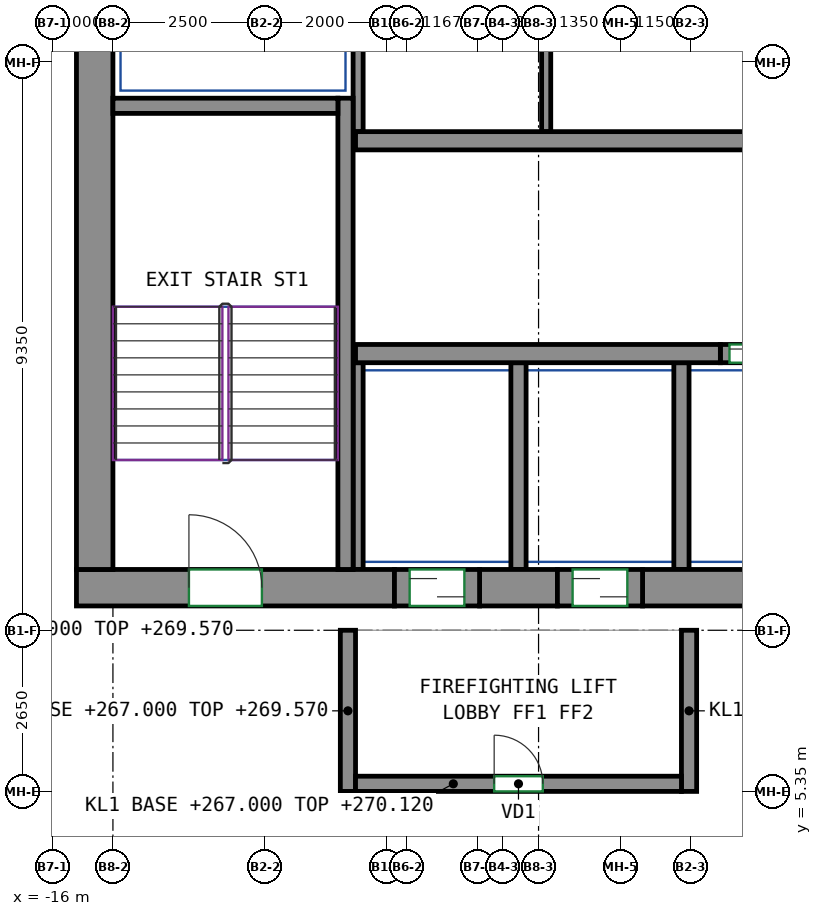
"""IFC4 building model, lengths in metres.
Left out: names, types, materials, properties, quantities, classifications, styles, units other than length and angle.
Written with IfcOpenShell. Run it as: python <this file> out.ifc"""

import sys

from ifc_helpers import new_model, si_unit, direction, frame, frame_2d, origin, place, context, subcontext, project, spatial, rectangle, extrude, source, transform, mapped, element, fill, save


model = new_model("IFC4")
c1 = context("Model", 3, precision=1e-05, world=origin(), true_north=direction((0.0, 1.0)))
c2 = subcontext(c1, "Body", "Model", "MODEL_VIEW")
j1 = project(units=[si_unit("LENGTHUNIT", "METRE"), si_unit("PLANEANGLEUNIT", "RADIAN")], contexts=[c1])
p1 = place(None, origin())
s1 = spatial("IfcSite", under=j1, at=p1, CompositionType="ELEMENT")
p2 = place(p1, origin())
s2 = spatial("IfcBuilding", under=s1, at=p2, CompositionType="ELEMENT")
p3 = place(p2, frame((0.0, 0.0, 267.0)))
s3 = spatial("IfcBuildingStorey", under=s2, at=p3, CompositionType="ELEMENT", Elevation=267.0)
m1 = source(origin(), c2, "Body", "SweptSolid", [
    extrude(rectangle(XDim=5.23, YDim=0.6, at=frame_2d((2.615, 0.0))), origin(), (0.0, 0.0, 1.0), 3.12),
])
p4 = place(p3, frame((-15.6, 8.7, 0.0), z_axis=(0.0, 0.0, 1.0), x_axis=(1.0, 0.0, 0.0)))
e1 = element("IfcWall", 1, at=p4, inside=s3, PredefinedType="SHEAR", context=c2, shape_type="MappedRepresentation", body=[
    mapped(m1, transform((0.0, 0.0, 0.0))),
])
p5 = place(p4, frame((1.85, 0.0, 0.0)))
e2 = element("IfcOpeningElement", 2, at=p5, cuts=e1, PredefinedType="OPENING", context=c2, shape_type="SweptSolid", body=[
    extrude(rectangle(XDim=1.2, YDim=2.1, at=frame_2d((0.6, 1.05))), frame((0.0, 0.31, 0.0), z_axis=(0.0, -1.0, 0.0), x_axis=(1.0, 0.0, 0.0)), (0.0, 0.0, 1.0), 0.62),
])
m2 = source(origin(), c2, "Body", "SweptSolid", [
    extrude(rectangle(XDim=1.28, YDim=0.6, at=frame_2d((0.64, 0.0))), origin(), (0.0, 0.0, 1.0), 3.12),
])
p6 = place(p3, frame((-8.97, 8.7, 0.0), z_axis=(0.0, 0.0, 1.0), x_axis=(1.0, 0.0, 0.0)))
e3 = element("IfcWall", 3, at=p6, inside=s3, PredefinedType="SHEAR", context=c2, shape_type="MappedRepresentation", body=[
    mapped(m2, transform((0.0, 0.0, 0.0))),
])
m3 = source(origin(), c2, "Body", "SweptSolid", [
    extrude(rectangle(XDim=14.18, YDim=0.6, at=frame_2d((7.09, 0.0))), origin(), (0.0, 0.0, 1.0), 3.12),
])
p7 = place(p3, frame((-6.29, 8.7, 0.0), z_axis=(0.0, 0.0, 1.0), x_axis=(1.0, 0.0, 0.0)))
e4 = element("IfcWall", 4, at=p7, inside=s3, PredefinedType="SHEAR", context=c2, shape_type="MappedRepresentation", body=[
    mapped(m3, transform((0.0, 0.0, 0.0))),
])
m4 = source(origin(), c2, "Body", "SweptSolid", [
    extrude(rectangle(XDim=12.0, YDim=0.6, at=frame_2d((6.0, 0.0))), origin(), (0.0, 0.0, 1.0), 3.12),
])
p8 = place(p3, frame((-15.3, 9.0, 0.0), z_axis=(0.0, 0.0, 1.0), x_axis=(0.0, 1.0, 0.0)))
e5 = element("IfcWall", 5, at=p8, inside=s3, PredefinedType="SHEAR", context=c2, shape_type="MappedRepresentation", body=[
    mapped(m4, transform((0.0, 0.0, 0.0))),
])
m5 = source(origin(), c2, "Body", "SweptSolid", [
    extrude(rectangle(XDim=7.75, YDim=0.25, at=frame_2d((3.875, 0.0))), origin(), (0.0, 0.0, 1.0), 3.12),
])
p9 = place(p3, frame((-11.175, 9.0, 0.0), z_axis=(0.0, 0.0, 1.0), x_axis=(0.0, 1.0, 0.0)))
e6 = element("IfcWall", 6, at=p9, inside=s3, PredefinedType="SHEAR", context=c2, shape_type="MappedRepresentation", body=[
    mapped(m5, transform((0.0, 0.0, 0.0))),
])
m6 = source(origin(), c2, "Body", "SweptSolid", [
    extrude(rectangle(XDim=3.7, YDim=0.25, at=frame_2d((1.85, 0.0))), origin(), (0.0, 0.0, 1.0), 3.12),
])
p10 = place(p3, frame((-15.0, 16.625, 0.0), z_axis=(0.0, 0.0, 1.0), x_axis=(1.0, 0.0, 0.0)))
e7 = element("IfcWall", 7, at=p10, inside=s3, PredefinedType="SHEAR", context=c2, shape_type="MappedRepresentation", body=[
    mapped(m6, transform((0.0, 0.0, 0.0))),
])
m7 = source(origin(), c2, "Body", "SweptSolid", [
    extrude(rectangle(XDim=6.0, YDim=0.3, at=frame_2d((3.0, 0.0))), origin(), (0.0, 0.0, 1.0), 3.12),
])
p11 = place(p3, frame((-11.01, 12.55, 0.0), z_axis=(0.0, 0.0, 1.0), x_axis=(1.0, 0.0, 0.0)))
e8 = element("IfcWall", 8, at=p11, inside=s3, PredefinedType="SHEAR", context=c2, shape_type="MappedRepresentation", body=[
    mapped(m7, transform((0.0, 0.0, 0.0))),
])
m8 = source(origin(), c2, "Body", "SweptSolid", [
    extrude(rectangle(XDim=22.08, YDim=0.3, at=frame_2d((11.04, 0.0))), origin(), (0.0, 0.0, 1.0), 3.12),
])
p12 = place(p3, frame((-11.01, 16.05, 0.0), z_axis=(0.0, 0.0, 1.0), x_axis=(1.0, 0.0, 0.0)))
e9 = element("IfcWall", 9, at=p12, inside=s3, PredefinedType="SHEAR", context=c2, shape_type="MappedRepresentation", body=[
    mapped(m8, transform((0.0, 0.0, 0.0))),
])
m9 = source(origin(), c2, "Body", "SweptSolid", [
    extrude(rectangle(XDim=1.4, YDim=0.3, at=frame_2d((0.7, 0.0))), origin(), (0.0, 0.0, 1.0), 3.12),
])
p13 = place(p3, frame((-5.01, 12.55, 0.0), z_axis=(0.0, 0.0, 1.0), x_axis=(1.0, 0.0, 0.0)))
e10 = element("IfcWall", 10, at=p13, inside=s3, PredefinedType="PARTITIONING", context=c2, shape_type="MappedRepresentation", body=[
    mapped(m9, transform((0.0, 0.0, 0.0))),
])
p14 = place(p13, frame((0.15, 0.0, 0.0)))
e11 = element("IfcOpeningElement", 11, at=p14, cuts=e10, PredefinedType="OPENING", context=c2, shape_type="SweptSolid", body=[
    extrude(rectangle(XDim=1.1, YDim=2.1, at=frame_2d((0.55, 1.05))), frame((0.0, 0.16, 0.0), z_axis=(0.0, -1.0, 0.0), x_axis=(1.0, 0.0, 0.0)), (0.0, 0.0, 1.0), 0.32),
])
m10 = source(origin(), c2, "Body", "SweptSolid", [
    extrude(rectangle(XDim=2.65, YDim=0.25, at=frame_2d((1.325, 0.0))), origin(), (0.0, 0.0, 1.0), 2.57),
])
for number, where, z_axis, x_axis in (
    (12, (-11.135, 5.35, 0.0), (0.0, 0.0, 1.0), (0.0, 1.0, 0.0)),
    (13, (-5.525, 5.35, 0.0), (0.0, 0.0, 1.0), (0.0, 1.0, 0.0)),
):
    element("IfcWall", number, at=place(p3, frame(where, z_axis=z_axis, x_axis=x_axis)), inside=s3, PredefinedType="PARTITIONING", context=c2, shape_type="MappedRepresentation", body=[
        mapped(m10, transform((0.0, 0.0, 0.0))),
    ])
m11 = source(origin(), c2, "Body", "SweptSolid", [
    extrude(rectangle(XDim=5.36, YDim=0.25, at=frame_2d((2.68, 0.0))), origin(), (0.0, 0.0, 1.0), 3.12),
])
p15 = place(p3, frame((-11.01, 5.475, 0.0), z_axis=(0.0, 0.0, 1.0), x_axis=(1.0, 0.0, 0.0)))
e14 = element("IfcWall", 14, at=p15, inside=s3, PredefinedType="PARTITIONING", context=c2, shape_type="MappedRepresentation", body=[
    mapped(m11, transform((0.0, 0.0, 0.0))),
])
p16 = place(p15, frame((2.28, 0.0, 0.0)))
e15 = element("IfcOpeningElement", 15, at=p16, cuts=e14, PredefinedType="OPENING", context=c2, shape_type="SweptSolid", body=[
    extrude(rectangle(XDim=0.8, YDim=2.0, at=frame_2d((0.4, 1.0))), frame((0.0, 0.135, 0.0), z_axis=(0.0, -1.0, 0.0), x_axis=(1.0, 0.0, 0.0)), (0.0, 0.0, 1.0), 0.27),
])
m12 = source(origin(), c2, "Body", "SweptSolid", [
    extrude(rectangle(XDim=4.8, YDim=0.165, at=frame_2d((2.4, 0.0))), origin(), (0.0, 0.0, 1.0), 3.12),
])
p17 = place(p3, frame((-10.968, 16.2, 0.0), z_axis=(0.0, 0.0, 1.0), x_axis=(0.0, 1.0, 0.0)))
e16 = element("IfcWall", 16, at=p17, inside=s3, PredefinedType="PARTITIONING", context=c2, shape_type="MappedRepresentation", body=[
    mapped(m12, transform((0.0, 0.0, 0.0))),
])
m13 = source(origin(), c2, "Body", "SweptSolid", [
    extrude(rectangle(XDim=3.4, YDim=0.165, at=frame_2d((1.7, 0.0))), origin(), (0.0, 0.0, 1.0), 3.12),
])
p18 = place(p3, frame((-10.968, 9.0, 0.0), z_axis=(0.0, 0.0, 1.0), x_axis=(0.0, 1.0, 0.0)))
e17 = element("IfcWall", 17, at=p18, inside=s3, PredefinedType="PARTITIONING", context=c2, shape_type="MappedRepresentation", body=[
    mapped(m13, transform((0.0, 0.0, 0.0))),
])
m14 = source(origin(), c2, "Body", "SweptSolid", [
    extrude(rectangle(XDim=3.4, YDim=0.25, at=frame_2d((1.7, 0.0))), origin(), (0.0, 0.0, 1.0), 3.12),
])
for number, where, z_axis, x_axis in (
    (18, (-5.65, 9.0, 0.0), (0.0, 0.0, 1.0), (0.0, 1.0, 0.0)),
    (19, (-8.33, 9.0, 0.0), (0.0, 0.0, 1.0), (0.0, 1.0, 0.0)),
):
    element("IfcWall", number, at=place(p3, frame(where, z_axis=z_axis, x_axis=x_axis)), inside=s3, PredefinedType="PARTITIONING", context=c2, shape_type="MappedRepresentation", body=[
        mapped(m14, transform((0.0, 0.0, 0.0))),
    ])
m15 = source(origin(), c2, "Body", "SweptSolid", [
    extrude(rectangle(XDim=4.8, YDim=0.15, at=frame_2d((2.4, 0.0))), origin(), (0.0, 0.0, 1.0), 3.12),
])
p19 = place(p3, frame((-7.875, 16.2, 0.0), z_axis=(0.0, 0.0, 1.0), x_axis=(0.0, 1.0, 0.0)))
e20 = element("IfcWall", 20, at=p19, inside=s3, PredefinedType="PARTITIONING", context=c2, shape_type="MappedRepresentation", body=[
    mapped(m15, transform((0.0, 0.0, 0.0))),
])
m16 = source(origin(), c2, "Body", "SweptSolid", [
    extrude(rectangle(XDim=1.4, YDim=0.6, at=frame_2d((0.7, 0.0))), origin(), (0.0, 0.0, 1.0), 2.7),
])
p20 = place(p3, frame((-10.37, 8.7, 0.0), z_axis=(0.0, 0.0, 1.0), x_axis=(1.0, 0.0, 0.0)))
e21 = element("IfcWall", 21, at=p20, inside=s3, PredefinedType="PARTITIONING", context=c2, shape_type="MappedRepresentation", body=[
    mapped(m16, transform((0.0, 0.0, 0.0))),
])
p21 = place(p20, frame((0.25, 0.0, 0.0)))
e22 = element("IfcOpeningElement", 22, at=p21, cuts=e21, PredefinedType="OPENING", context=c2, shape_type="SweptSolid", body=[
    extrude(rectangle(XDim=0.9, YDim=2.1, at=frame_2d((0.45, 1.05))), frame((0.0, 0.31, 0.0), z_axis=(0.0, -1.0, 0.0), x_axis=(1.0, 0.0, 0.0)), (0.0, 0.0, 1.0), 0.62),
])
m17 = source(origin(), c2, "Body", "SweptSolid", [
    extrude(rectangle(XDim=1.4, YDim=0.6, at=frame_2d((0.7, 0.0))), origin(), (0.0, 0.0, 1.0), 2.7),
])
p22 = place(p3, frame((-7.69, 8.7, 0.0), z_axis=(0.0, 0.0, 1.0), x_axis=(1.0, 0.0, 0.0)))
e23 = element("IfcWall", 23, at=p22, inside=s3, PredefinedType="PARTITIONING", context=c2, shape_type="MappedRepresentation", body=[
    mapped(m17, transform((0.0, 0.0, 0.0))),
])
p23 = place(p22, frame((0.25, 0.0, 0.0)))
e24 = element("IfcOpeningElement", 24, at=p23, cuts=e23, PredefinedType="OPENING", context=c2, shape_type="SweptSolid", body=[
    extrude(rectangle(XDim=0.9, YDim=2.1, at=frame_2d((0.45, 1.05))), frame((0.0, 0.31, 0.0), z_axis=(0.0, -1.0, 0.0), x_axis=(1.0, 0.0, 0.0)), (0.0, 0.0, 1.0), 0.62),
])
p24 = place(p16, origin())
e25 = element("IfcDoor", 25, at=p24, inside=s3, OperationType="SINGLE_SWING_LEFT", PredefinedType="DOOR", context=c2, shape_type="SweptSolid", body=[
    extrude(rectangle(XDim=0.8, YDim=2.0, at=frame_2d((0.4, 1.0))), frame((0.0, 0.025, 0.0), z_axis=(0.0, -1.0, 0.0), x_axis=(1.0, 0.0, 0.0)), (0.0, 0.0, 1.0), 0.05),
])
fill(e15, e25)
p25 = place(p21, origin())
e26 = element("IfcDoor", 26, at=p25, inside=s3, OperationType="SLIDING_TO_LEFT", PredefinedType="DOOR", context=c2, shape_type="SweptSolid", body=[
    extrude(rectangle(XDim=0.9, YDim=2.1, at=frame_2d((0.45, 1.05))), frame((0.0, 0.205, 0.0), z_axis=(0.0, -1.0, 0.0), x_axis=(1.0, 0.0, 0.0)), (0.0, 0.0, 1.0), 0.05),
])
fill(e22, e26)
p26 = place(p23, origin())
e27 = element("IfcDoor", 27, at=p26, inside=s3, OperationType="SLIDING_TO_RIGHT", PredefinedType="DOOR", context=c2, shape_type="SweptSolid", body=[
    extrude(rectangle(XDim=0.9, YDim=2.1, at=frame_2d((0.45, 1.05))), frame((0.0, 0.205, 0.0), z_axis=(0.0, -1.0, 0.0), x_axis=(1.0, 0.0, 0.0)), (0.0, 0.0, 1.0), 0.05),
])
fill(e24, e27)
p27 = place(p14, origin())
e28 = element("IfcDoor", 28, at=p27, inside=s3, OperationType="DOUBLE_DOOR_SLIDING", PredefinedType="DOOR", context=c2, shape_type="SweptSolid", body=[
    extrude(rectangle(XDim=1.1, YDim=2.1, at=frame_2d((0.55, 1.05))), frame((0.0, 0.025, 0.0), z_axis=(0.0, -1.0, 0.0), x_axis=(1.0, 0.0, 0.0)), (0.0, 0.0, 1.0), 0.05),
])
fill(e11, e28)
p28 = place(p5, origin())
e29 = element("IfcDoor", 29, at=p28, inside=s3, OperationType="DOUBLE_DOOR_SINGLE_SWING", PredefinedType="DOOR", context=c2, shape_type="SweptSolid", body=[
    extrude(rectangle(XDim=1.2, YDim=2.1, at=frame_2d((0.6, 1.05))), frame((0.0, 0.205, 0.0), z_axis=(0.0, -1.0, 0.0), x_axis=(1.0, 0.0, 0.0)), (0.0, 0.0, 1.0), 0.05),
])
fill(e2, e29)
save(model, sys.argv[1])
